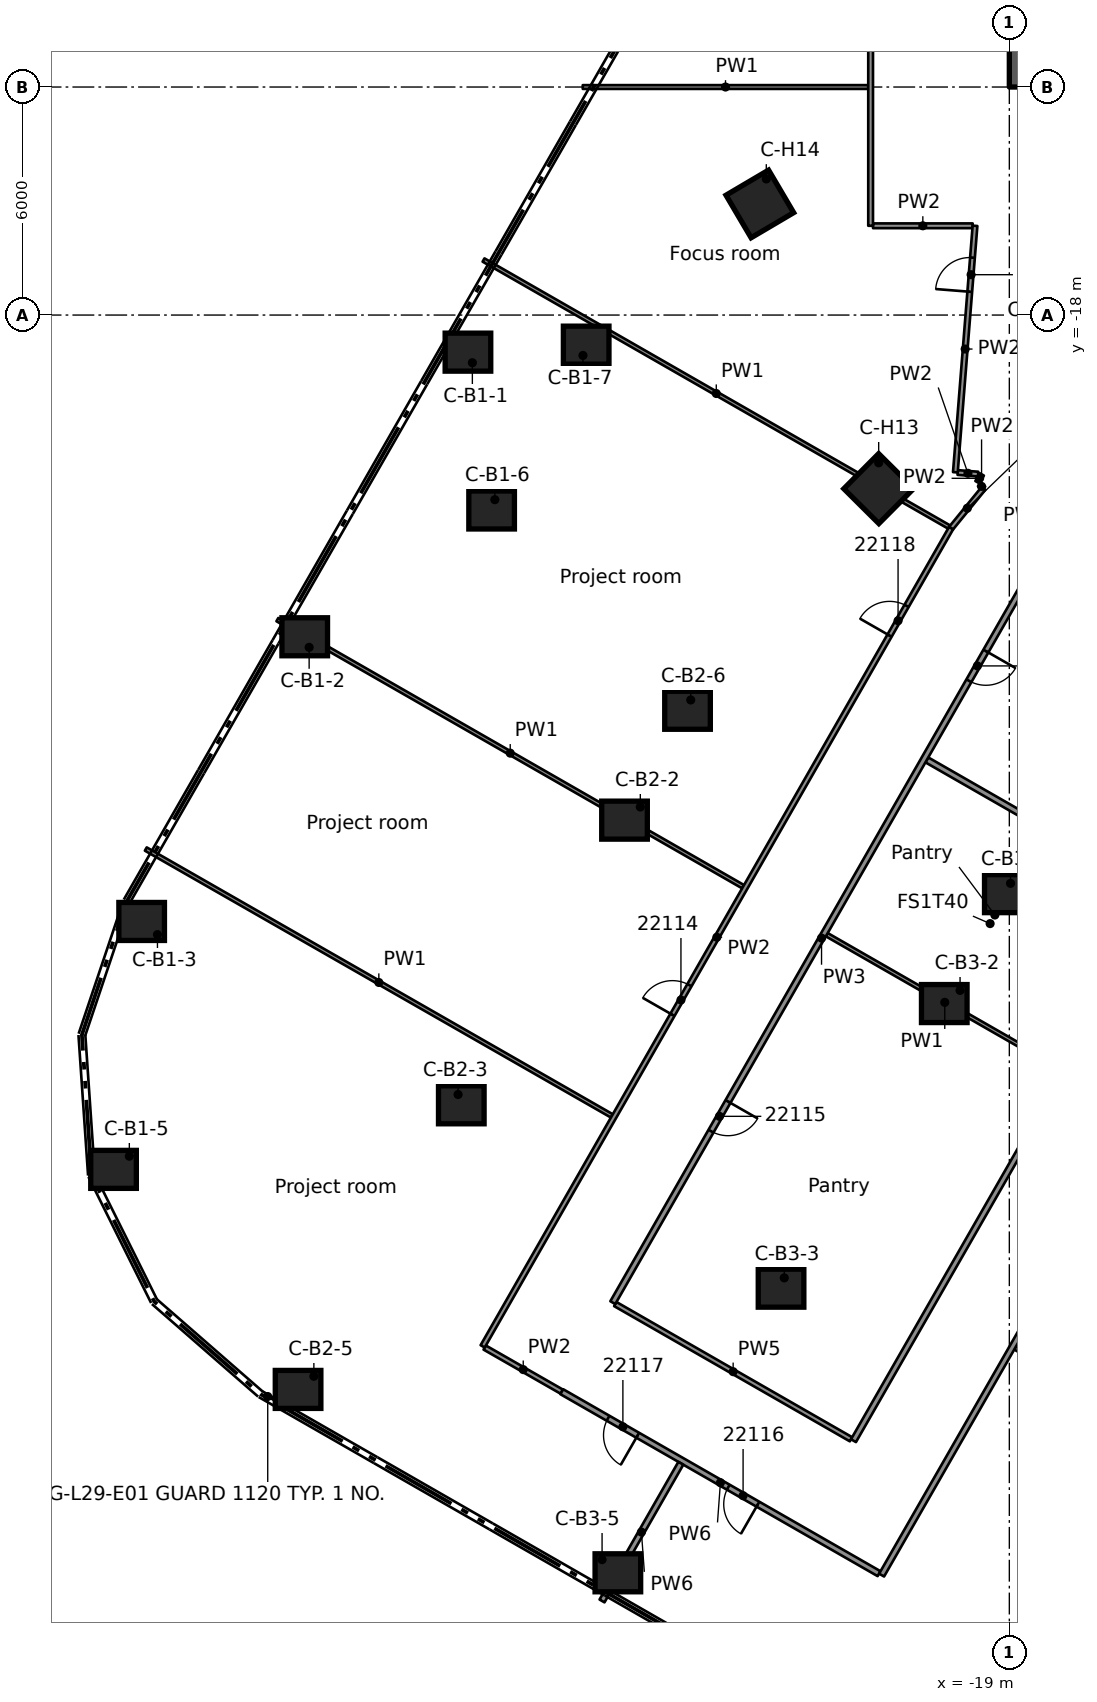
"""IFC4 building model, lengths in metres.
Left out: names, types, materials, properties, quantities, classifications, styles, units other than length and angle.
Written with IfcOpenShell. Run it as: python <this file> out.ifc"""

import sys

from ifc_helpers import new_model, si_unit, direction, frame, frame_2d, origin, origin_2d, place, context, subcontext, project, spatial, rectangle, extrude, element, fill, save


model = new_model("IFC4")
c1 = context("Model", 3, precision=1e-05, world=origin(), true_north=direction((0.0, 1.0)))
c2 = subcontext(c1, "Body", "Model", "MODEL_VIEW")
j1 = project(units=[si_unit("LENGTHUNIT", "METRE"), si_unit("PLANEANGLEUNIT", "RADIAN")], contexts=[c1])
p1 = place(None, origin())
s1 = spatial("IfcSite", under=j1, at=p1, CompositionType="ELEMENT")
p2 = place(p1, origin())
s2 = spatial("IfcBuilding", under=s1, at=p2, CompositionType="ELEMENT")
p3 = place(p2, frame((0.0, 0.0, 116.2)))
s3 = spatial("IfcBuildingStorey", under=s2, at=p3, CompositionType="ELEMENT", Elevation=116.2)
p4 = place(p3, frame((-18.55, -12.0, 0.0), z_axis=(0.0, 0.0, 1.0), x_axis=(0.0, 1.0, 0.0)))
e1 = element("IfcWall", 1, at=p4, inside=s3, PredefinedType="SHEAR", context=c2, shape_type="SweptSolid", body=[
    extrude(rectangle(XDim=24.0, YDim=0.9, at=frame_2d((12.0, 0.0))), origin(), (0.0, 0.0, 1.0), 3.5),
])
p5 = place(p4, frame((10.1, 0.0, 0.0)))
e2 = element("IfcOpeningElement", 2, at=p5, cuts=e1, PredefinedType="OPENING", context=c2, shape_type="SweptSolid", body=[
    extrude(rectangle(XDim=1.8, YDim=2.1, at=frame_2d((0.9, 1.05))), frame((0.0, 0.46, 0.0), z_axis=(0.0, -1.0, 0.0), x_axis=(1.0, 0.0, 0.0)), (0.0, 0.0, 1.0), 0.92),
])
for number, where, z_axis, x_axis in (
    (3, (-33.246, -18.976, 0.0), (0.0, 0.0, 1.0), (1.0, 0.0, 0.0)),
    (4, (-37.541, -26.465, 0.0), (0.0, 0.0, 1.0), (1.0, 0.0, 0.0)),
    (5, (-41.832, -33.956, 0.0), (0.0, 0.0, 1.0), (1.0, 0.0, 0.0)),
    (6, (-42.572, -40.479, 0.0), (0.0, 0.0, 1.0), (1.0, 0.0, 0.0)),
    (7, (-32.623, -23.129, 0.0), (0.0, 0.0, 1.0), (1.0, 0.0, 0.0)),
    (8, (-30.135, -18.792, 0.0), (0.0, 0.0, 1.0), (1.0, 0.0, 0.0)),
    (9, (-29.126, -31.29, 0.0), (0.0, 0.0, 1.0), (1.0, 0.0, 0.0)),
    (10, (-33.421, -38.78, 0.0), (0.0, 0.0, 1.0), (1.0, 0.0, 0.0)),
    (11, (-37.716, -46.269, 0.0), (0.0, 0.0, 1.0), (1.0, 0.0, 0.0)),
    (12, (-27.468, -28.399, 0.0), (0.0, 0.0, 1.0), (1.0, 0.0, 0.0)),
    (13, (-20.712, -36.116, 0.0), (0.0, 0.0, 1.0), (1.0, 0.0, 0.0)),
    (14, (-25.007, -43.605, 0.0), (0.0, 0.0, 1.0), (1.0, 0.0, 0.0)),
    (15, (-29.301, -51.094, 0.0), (0.0, 0.0, 1.0), (1.0, 0.0, 0.0)),
    (16, (-19.053, -33.224, 0.0), (0.0, 0.0, 1.0), (1.0, 0.0, 0.0)),
):
    element("IfcColumn", number, at=place(p3, frame(where, z_axis=z_axis, x_axis=x_axis)), inside=s3, PredefinedType="COLUMN", context=c2, shape_type="SweptSolid", body=[
        extrude(rectangle(XDim=1.2, YDim=1.0, at=origin_2d()), origin(), (0.0, 0.0, 1.0), 3.5),
    ])
for number, where, z_axis, x_axis in (
    (17, (-22.436, -22.567, 0.0), (0.0, 0.0, 1.0), (-0.705, -0.709, 0.0)),
    (18, (-25.565, -15.076, 0.0), (0.0, 0.0, 1.0), (-0.861, -0.508, 0.0)),
):
    element("IfcColumn", number, at=place(p3, frame(where, z_axis=z_axis, x_axis=x_axis)), inside=s3, PredefinedType="COLUMN", context=c2, shape_type="SweptSolid", body=[
        extrude(rectangle(XDim=1.3, YDim=1.3, at=origin_2d()), origin(), (0.0, 0.0, 1.0), 3.5),
    ])
p6 = place(p3, frame((-19.782, -22.457, 0.0), z_axis=(0.0, 0.0, 1.0), x_axis=(0.710465901212, -0.703731627267, 0.0)))
e19 = element("IfcWall", 19, at=p6, inside=s3, PredefinedType="PARTITIONING", context=c2, shape_type="SweptSolid", body=[
    extrude(rectangle(XDim=0.145, YDim=0.125, at=frame_2d((0.073, 0.0))), origin(), (0.0, 0.0, 1.0), 3.08),
])
p7 = place(p3, frame((-32.805, -45.167, 0.0), z_axis=(0.0, 0.0, 1.0), x_axis=(0.867850650995, -0.496825168009, 0.0)))
e20 = element("IfcWall", 20, at=p7, inside=s3, PredefinedType="PARTITIONING", context=c2, shape_type="SweptSolid", body=[
    extrude(rectangle(XDim=2.337, YDim=0.125, at=frame_2d((1.168, 0.0))), origin(), (0.0, 0.0, 1.0), 3.08),
])
p8 = place(p3, frame((-22.428, -51.117, 0.0), z_axis=(0.0, 0.0, 1.0), x_axis=(-0.867485037489, 0.497463274758, 0.0)))
e21 = element("IfcWall", 21, at=p8, inside=s3, PredefinedType="PARTITIONING", context=c2, shape_type="SweptSolid", body=[
    extrude(rectangle(XDim=9.625, YDim=0.15, at=frame_2d((4.812, 0.0))), origin(), (0.0, 0.0, 1.0), 2.469),
])
p9 = place(p8, frame((3.675, 0.0, 0.0)))
e22 = element("IfcOpeningElement", 22, at=p9, cuts=e21, PredefinedType="OPENING", context=c2, shape_type="SweptSolid", body=[
    extrude(rectangle(XDim=0.9, YDim=2.1, at=frame_2d((0.45, 1.05))), frame((0.0, 0.085, 0.0), z_axis=(0.0, -1.0, 0.0), x_axis=(1.0, 0.0, 0.0)), (0.0, 0.0, 1.0), 0.17),
])
p10 = place(p8, frame((7.321, 0.0, 0.0)))
e23 = element("IfcOpeningElement", 23, at=p10, cuts=e21, PredefinedType="OPENING", context=c2, shape_type="SweptSolid", body=[
    extrude(rectangle(XDim=0.9, YDim=2.1, at=frame_2d((0.45, 1.05))), frame((0.0, 0.085, 0.0), z_axis=(0.0, -1.0, 0.0), x_axis=(1.0, 0.0, 0.0)), (0.0, 0.0, 1.0), 0.17),
])
p11 = place(p3, frame((-29.369, -44.023, 0.0), z_axis=(0.0, 0.0, 1.0), x_axis=(0.867422571977, -0.49757218735, 0.0)))
e24 = element("IfcWall", 24, at=p11, inside=s3, PredefinedType="PARTITIONING", context=c2, shape_type="SweptSolid", body=[
    extrude(rectangle(XDim=7.151, YDim=0.125, at=frame_2d((3.575, 0.0))), origin(), (0.0, 0.0, 1.0), 2.469),
])
p12 = place(p3, frame((-41.723, -32.05, 0.0), z_axis=(0.0, 0.0, 1.0), x_axis=(0.867815443194, -0.49688666369, 0.0)))
e25 = element("IfcWall", 25, at=p12, inside=s3, PredefinedType="PARTITIONING", context=c2, shape_type="SweptSolid", body=[
    extrude(rectangle(XDim=14.132, YDim=0.1, at=frame_2d((7.066, 0.0))), origin(), (0.0, 0.0, 1.0), 3.08),
])
p13 = place(p3, frame((-18.834, -45.155, 0.0), z_axis=(0.0, 0.0, 1.0), x_axis=(0.867832273934, -0.496857267552, 0.0)))
e26 = element("IfcWall", 26, at=p13, inside=s3, PredefinedType="PARTITIONING", context=c2, shape_type="SweptSolid", body=[
    extrude(rectangle(XDim=14.125, YDim=0.15, at=frame_2d((7.062, 0.0))), origin(), (0.0, 0.0, 1.0), 2.469),
])
p14 = place(p3, frame((-38.261, -26.013, 0.0), z_axis=(0.0, 0.0, 1.0), x_axis=(0.867471065007, -0.49748763942, 0.0)))
e27 = element("IfcWall", 27, at=p14, inside=s3, PredefinedType="PARTITIONING", context=c2, shape_type="SweptSolid", body=[
    extrude(rectangle(XDim=14.127, YDim=0.1, at=frame_2d((7.063, 0.0))), origin(), (0.0, 0.0, 1.0), 3.08),
])
p15 = place(p3, frame((-23.804, -34.304, 0.0), z_axis=(0.0, 0.0, 1.0), x_axis=(0.867490790569, -0.497453242304, 0.0)))
e28 = element("IfcWall", 28, at=p15, inside=s3, PredefinedType="PARTITIONING", context=c2, shape_type="SweptSolid", body=[
    extrude(rectangle(XDim=7.158, YDim=0.1, at=frame_2d((3.579, 0.0))), origin(), (0.0, 0.0, 1.0), 3.08),
])
p16 = place(p3, frame((-21.17, -29.705, 0.0), z_axis=(0.0, 0.0, 1.0), x_axis=(0.86744058168, -0.497540789539, 0.0)))
e29 = element("IfcWall", 29, at=p16, inside=s3, PredefinedType="PARTITIONING", context=c2, shape_type="SweptSolid", body=[
    extrude(rectangle(XDim=7.161, YDim=0.15, at=frame_2d((3.581, 0.0))), origin(), (0.0, 0.0, 1.0), 3.08),
])
p17 = place(p3, frame((-32.836, -16.552, 0.0), z_axis=(0.0, 0.0, 1.0), x_axis=(0.867495211783, -0.497445532229, 0.0)))
e30 = element("IfcWall", 30, at=p17, inside=s3, PredefinedType="PARTITIONING", context=c2, shape_type="SweptSolid", body=[
    extrude(rectangle(XDim=14.12, YDim=0.1, at=frame_2d((7.06, 0.0))), origin(), (0.0, 0.0, 1.0), 3.08),
])
p18 = place(p3, frame((-20.358, -22.143, 0.0), z_axis=(0.0, 0.0, 1.0), x_axis=(0.996954986242, -0.07797919856, 0.0)))
e31 = element("IfcWall", 31, at=p18, inside=s3, PredefinedType="PARTITIONING", context=c2, shape_type="SweptSolid", body=[
    extrude(rectangle(XDim=0.539, YDim=0.125, at=frame_2d((0.269, 0.0))), origin(), (0.0, 0.0, 1.0), 3.08),
])
p19 = place(p3, frame((-22.587, -15.651, 0.0), z_axis=(0.0, 0.0, 1.0), x_axis=(1.0, 0.0, 0.0)))
e32 = element("IfcWall", 32, at=p19, inside=s3, PredefinedType="PARTITIONING", context=c2, shape_type="SweptSolid", body=[
    extrude(rectangle(XDim=2.622, YDim=0.125, at=frame_2d((1.311, 0.0))), origin(), (0.0, 0.0, 1.0), 3.08),
])
p20 = place(p3, frame((-30.225, -12.0, 0.0), z_axis=(0.0, 0.0, 1.0), x_axis=(1.0, 0.0, 0.0)))
e33 = element("IfcWall", 33, at=p20, inside=s3, PredefinedType="PARTITIONING", context=c2, shape_type="SweptSolid", body=[
    extrude(rectangle(XDim=7.513, YDim=0.1, at=frame_2d((3.757, 0.0))), origin(), (0.0, 0.0, 1.0), 3.08),
])
p21 = place(p3, frame((-19.679, -22.559, 0.0), z_axis=(0.0, 0.0, 1.0), x_axis=(-0.631761389126, -0.77516291656, 0.0)))
e34 = element("IfcWall", 34, at=p21, inside=s3, PredefinedType="PARTITIONING", context=c2, shape_type="SweptSolid", body=[
    extrude(rectangle(XDim=1.352, YDim=0.125, at=frame_2d((0.676, 0.0))), origin(), (0.0, 0.0, 1.0), 3.08),
])
p22 = place(p3, frame((-10.021, -29.636, 0.0), z_axis=(0.0, 0.0, 1.0), x_axis=(-0.49746005822, -0.867486882019, 0.0)))
e35 = element("IfcWall", 35, at=p22, inside=s3, PredefinedType="PARTITIONING", context=c2, shape_type="SweptSolid", body=[
    extrude(rectangle(XDim=24.806, YDim=0.15, at=frame_2d((12.403, 0.0))), origin(), (0.0, 0.0, 1.0), 3.08),
])
p23 = place(p22, frame((2.35, 0.0, 0.0)))
e36 = element("IfcOpeningElement", 36, at=p23, cuts=e35, PredefinedType="OPENING", context=c2, shape_type="SweptSolid", body=[
    extrude(rectangle(XDim=1.1, YDim=2.1, at=frame_2d((0.55, 1.05))), frame((0.0, 0.085, 0.0), z_axis=(0.0, -1.0, 0.0), x_axis=(1.0, 0.0, 0.0)), (0.0, 0.0, 1.0), 0.17),
])
p24 = place(p22, frame((7.706, 0.0, 0.0)))
e37 = element("IfcOpeningElement", 37, at=p24, cuts=e35, PredefinedType="OPENING", context=c2, shape_type="SweptSolid", body=[
    extrude(rectangle(XDim=1.1, YDim=2.1, at=frame_2d((0.55, 1.05))), frame((0.0, 0.085, 0.0), z_axis=(0.0, -1.0, 0.0), x_axis=(1.0, 0.0, 0.0)), (0.0, 0.0, 1.0), 0.17),
])
p25 = place(p22, frame((14.007, 0.0, 0.0)))
e38 = element("IfcOpeningElement", 38, at=p25, cuts=e35, PredefinedType="OPENING", context=c2, shape_type="SweptSolid", body=[
    extrude(rectangle(XDim=0.9, YDim=2.1, at=frame_2d((0.45, 1.05))), frame((0.0, 0.085, 0.0), z_axis=(0.0, -1.0, 0.0), x_axis=(1.0, 0.0, 0.0)), (0.0, 0.0, 1.0), 0.17),
])
p26 = place(p3, frame((-23.101, -47.618, 0.0), z_axis=(0.0, 0.0, 1.0), x_axis=(0.497490898243, 0.86746919609, 0.0)))
e39 = element("IfcWall", 39, at=p26, inside=s3, PredefinedType="PARTITIONING", context=c2, shape_type="SweptSolid", body=[
    extrude(rectangle(XDim=21.771, YDim=0.15, at=frame_2d((10.886, 0.0))), origin(), (0.0, 0.0, 1.0), 3.08),
])
p27 = place(p26, frame((13.3, 0.0, 0.0)))
e40 = element("IfcOpeningElement", 40, at=p27, cuts=e39, PredefinedType="OPENING", context=c2, shape_type="SweptSolid", body=[
    extrude(rectangle(XDim=0.9, YDim=2.1, at=frame_2d((0.45, 1.05))), frame((0.0, 0.085, 0.0), z_axis=(0.0, -1.0, 0.0), x_axis=(1.0, 0.0, 0.0)), (0.0, 0.0, 1.0), 0.17),
])
p28 = place(p3, frame((-29.718, -51.835, 0.0), z_axis=(0.0, 0.0, 1.0), x_axis=(0.496800084917, 0.867865010026, 0.0)))
e41 = element("IfcWall", 41, at=p28, inside=s3, PredefinedType="PARTITIONING", context=c2, shape_type="SweptSolid", body=[
    extrude(rectangle(XDim=4.175, YDim=0.15, at=frame_2d((2.087, 0.0))), origin(), (0.0, 0.0, 1.0), 2.469),
])
p29 = place(p3, frame((-18.449, -24.802, 0.0), z_axis=(0.0, 0.0, 1.0), x_axis=(-0.496915373234, -0.867799004288, 0.0)))
e42 = element("IfcWall", 42, at=p29, inside=s3, PredefinedType="PARTITIONING", context=c2, shape_type="SweptSolid", body=[
    extrude(rectangle(XDim=22.107, YDim=0.15, at=frame_2d((11.053, 0.0))), origin(), (0.0, 0.0, 1.0), 3.08),
])
p30 = place(p29, frame((2.35, 0.0, 0.0)))
e43 = element("IfcOpeningElement", 43, at=p30, cuts=e42, PredefinedType="OPENING", context=c2, shape_type="SweptSolid", body=[
    extrude(rectangle(XDim=0.9, YDim=2.1, at=frame_2d((0.45, 1.05))), frame((0.0, 0.085, 0.0), z_axis=(0.0, -1.0, 0.0), x_axis=(1.0, 0.0, 0.0)), (0.0, 0.0, 1.0), 0.17),
])
p31 = place(p29, frame((16.007, 0.0, 0.0)))
e44 = element("IfcOpeningElement", 44, at=p31, cuts=e42, PredefinedType="OPENING", context=c2, shape_type="SweptSolid", body=[
    extrude(rectangle(XDim=0.9, YDim=2.1, at=frame_2d((0.45, 1.05))), frame((0.0, 0.085, 0.0), z_axis=(0.0, -1.0, 0.0), x_axis=(1.0, 0.0, 0.0)), (0.0, 0.0, 1.0), 0.17),
])
p32 = place(p3, frame((-32.859, -45.136, 0.0), z_axis=(0.0, 0.0, 1.0), x_axis=(0.49685627334, 0.867832843146, 0.0)))
e45 = element("IfcWall", 45, at=p32, inside=s3, PredefinedType="PARTITIONING", context=c2, shape_type="SweptSolid", body=[
    extrude(rectangle(XDim=24.808, YDim=0.125, at=frame_2d((12.404, 0.0))), origin(), (0.0, 0.0, 1.0), 3.08),
])
p33 = place(p32, frame((10.052, 0.0, 0.0)))
e46 = element("IfcOpeningElement", 46, at=p33, cuts=e45, PredefinedType="OPENING", context=c2, shape_type="SweptSolid", body=[
    extrude(rectangle(XDim=0.9, YDim=2.1, at=frame_2d((0.45, 1.05))), frame((0.0, 0.073, 0.0), z_axis=(0.0, -1.0, 0.0), x_axis=(1.0, 0.0, 0.0)), (0.0, 0.0, 1.0), 0.145),
])
p34 = place(p32, frame((21.551, 0.0, 0.0)))
e47 = element("IfcOpeningElement", 47, at=p34, cuts=e45, PredefinedType="OPENING", context=c2, shape_type="SweptSolid", body=[
    extrude(rectangle(XDim=0.9, YDim=2.1, at=frame_2d((0.45, 1.05))), frame((0.0, 0.073, 0.0), z_axis=(0.0, -1.0, 0.0), x_axis=(1.0, 0.0, 0.0)), (0.0, 0.0, 1.0), 0.145),
])
p35 = place(p3, frame((-19.84, -22.398, 0.0), z_axis=(0.0, 0.0, 1.0), x_axis=(0.496584525781, 0.867988369021, 0.0)))
e48 = element("IfcWall", 48, at=p35, inside=s3, PredefinedType="PARTITIONING", context=c2, shape_type="SweptSolid", body=[
    extrude(rectangle(XDim=0.236, YDim=0.125, at=frame_2d((0.118, 0.0))), origin(), (0.0, 0.0, 1.0), 3.08),
])
p36 = place(p3, frame((-20.42, -22.137, 0.0), z_axis=(0.0, 0.0, 1.0), x_axis=(0.079448389508, 0.996838980681, 0.0)))
e49 = element("IfcWall", 49, at=p36, inside=s3, PredefinedType="PARTITIONING", context=c2, shape_type="SweptSolid", body=[
    extrude(rectangle(XDim=6.505, YDim=0.125, at=frame_2d((3.253, 0.0))), origin(), (0.0, 0.0, 1.0), 3.08),
])
p37 = place(p36, frame((4.765, 0.0, 0.0)))
e50 = element("IfcOpeningElement", 50, at=p37, cuts=e49, PredefinedType="OPENING", context=c2, shape_type="SweptSolid", body=[
    extrude(rectangle(XDim=0.9, YDim=2.1, at=frame_2d((0.45, 1.05))), frame((0.0, 0.073, 0.0), z_axis=(0.0, -1.0, 0.0), x_axis=(1.0, 0.0, 0.0)), (0.0, 0.0, 1.0), 0.145),
])
p38 = place(p3, frame((-22.65, -15.651, 0.0), z_axis=(0.0, 0.0, 1.0), x_axis=(0.0, 1.0, 0.0)))
e51 = element("IfcWall", 51, at=p38, inside=s3, PredefinedType="PARTITIONING", context=c2, shape_type="SweptSolid", body=[
    extrude(rectangle(XDim=31.302, YDim=0.125, at=frame_2d((15.651, 0.0))), origin(), (0.0, 0.0, 1.0), 3.08),
])
p39 = place(p38, frame((8.251, 0.0, 0.0)))
e52 = element("IfcOpeningElement", 52, at=p39, cuts=e51, PredefinedType="OPENING", context=c2, shape_type="SweptSolid", body=[
    extrude(rectangle(XDim=0.9, YDim=2.1, at=frame_2d((0.45, 1.05))), frame((0.0, 0.073, 0.0), z_axis=(0.0, -1.0, 0.0), x_axis=(1.0, 0.0, 0.0)), (0.0, 0.0, 1.0), 0.145),
])
p40 = place(p38, frame((12.251, 0.0, 0.0)))
e53 = element("IfcOpeningElement", 53, at=p40, cuts=e51, PredefinedType="OPENING", context=c2, shape_type="SweptSolid", body=[
    extrude(rectangle(XDim=0.9, YDim=2.1, at=frame_2d((0.45, 1.05))), frame((0.0, 0.073, 0.0), z_axis=(0.0, -1.0, 0.0), x_axis=(1.0, 0.0, 0.0)), (0.0, 0.0, 1.0), 0.145),
])
p41 = place(p38, frame((24.002, 0.0, 0.0)))
e54 = element("IfcOpeningElement", 54, at=p41, cuts=e51, PredefinedType="OPENING", context=c2, shape_type="SweptSolid", body=[
    extrude(rectangle(XDim=1.1, YDim=2.1, at=frame_2d((0.55, 1.05))), frame((0.0, 0.073, 0.0), z_axis=(0.0, -1.0, 0.0), x_axis=(1.0, 0.0, 0.0)), (0.0, 0.0, 1.0), 0.145),
])
p42 = place(p30, origin())
e55 = element("IfcDoor", 55, at=p42, inside=s3, OperationType="SINGLE_SWING_LEFT", PredefinedType="DOOR", context=c2, shape_type="SweptSolid", body=[
    extrude(rectangle(XDim=0.9, YDim=2.1, at=frame_2d((0.45, 1.05))), frame((0.0, 0.025, 0.0), z_axis=(0.0, -1.0, 0.0), x_axis=(1.0, 0.0, 0.0)), (0.0, 0.0, 1.0), 0.05),
])
fill(e43, e55)
p43 = place(p33, origin())
e56 = element("IfcDoor", 56, at=p43, inside=s3, OperationType="SINGLE_SWING_LEFT", PredefinedType="DOOR", context=c2, shape_type="SweptSolid", body=[
    extrude(rectangle(XDim=0.9, YDim=2.1, at=frame_2d((0.45, 1.05))), frame((0.0, 0.025, 0.0), z_axis=(0.0, -1.0, 0.0), x_axis=(1.0, 0.0, 0.0)), (0.0, 0.0, 1.0), 0.05),
])
fill(e46, e56)
p44 = place(p31, origin())
e57 = element("IfcDoor", 57, at=p44, inside=s3, OperationType="SINGLE_SWING_RIGHT", PredefinedType="DOOR", context=c2, shape_type="SweptSolid", body=[
    extrude(rectangle(XDim=0.9, YDim=2.1, at=frame_2d((0.45, 1.05))), frame((0.0, 0.025, 0.0), z_axis=(0.0, -1.0, 0.0), x_axis=(1.0, 0.0, 0.0)), (0.0, 0.0, 1.0), 0.05),
])
fill(e44, e57)
p45 = place(p9, origin())
e58 = element("IfcDoor", 58, at=p45, inside=s3, OperationType="SINGLE_SWING_LEFT", PredefinedType="DOOR", context=c2, shape_type="SweptSolid", body=[
    extrude(rectangle(XDim=0.9, YDim=2.1, at=frame_2d((0.45, 1.05))), frame((0.0, 0.025, 0.0), z_axis=(0.0, -1.0, 0.0), x_axis=(1.0, 0.0, 0.0)), (0.0, 0.0, 1.0), 0.05),
])
fill(e22, e58)
p46 = place(p10, origin())
e59 = element("IfcDoor", 59, at=p46, inside=s3, OperationType="SINGLE_SWING_RIGHT", PredefinedType="DOOR", context=c2, shape_type="SweptSolid", body=[
    extrude(rectangle(XDim=0.9, YDim=2.1, at=frame_2d((0.45, 1.05))), frame((0.0, 0.025, 0.0), z_axis=(0.0, -1.0, 0.0), x_axis=(1.0, 0.0, 0.0)), (0.0, 0.0, 1.0), 0.05),
])
fill(e23, e59)
p47 = place(p34, origin())
e60 = element("IfcDoor", 60, at=p47, inside=s3, OperationType="SINGLE_SWING_RIGHT", PredefinedType="DOOR", context=c2, shape_type="SweptSolid", body=[
    extrude(rectangle(XDim=0.9, YDim=2.1, at=frame_2d((0.45, 1.05))), frame((0.0, 0.025, 0.0), z_axis=(0.0, -1.0, 0.0), x_axis=(1.0, 0.0, 0.0)), (0.0, 0.0, 1.0), 0.05),
])
fill(e47, e60)
p48 = place(p37, origin())
e61 = element("IfcDoor", 61, at=p48, inside=s3, OperationType="SINGLE_SWING_RIGHT", PredefinedType="DOOR", context=c2, shape_type="SweptSolid", body=[
    extrude(rectangle(XDim=0.9, YDim=2.1, at=frame_2d((0.45, 1.05))), frame((0.0, 0.025, 0.0), z_axis=(0.0, -1.0, 0.0), x_axis=(1.0, 0.0, 0.0)), (0.0, 0.0, 1.0), 0.05),
])
fill(e50, e61)
save(model, sys.argv[1])
